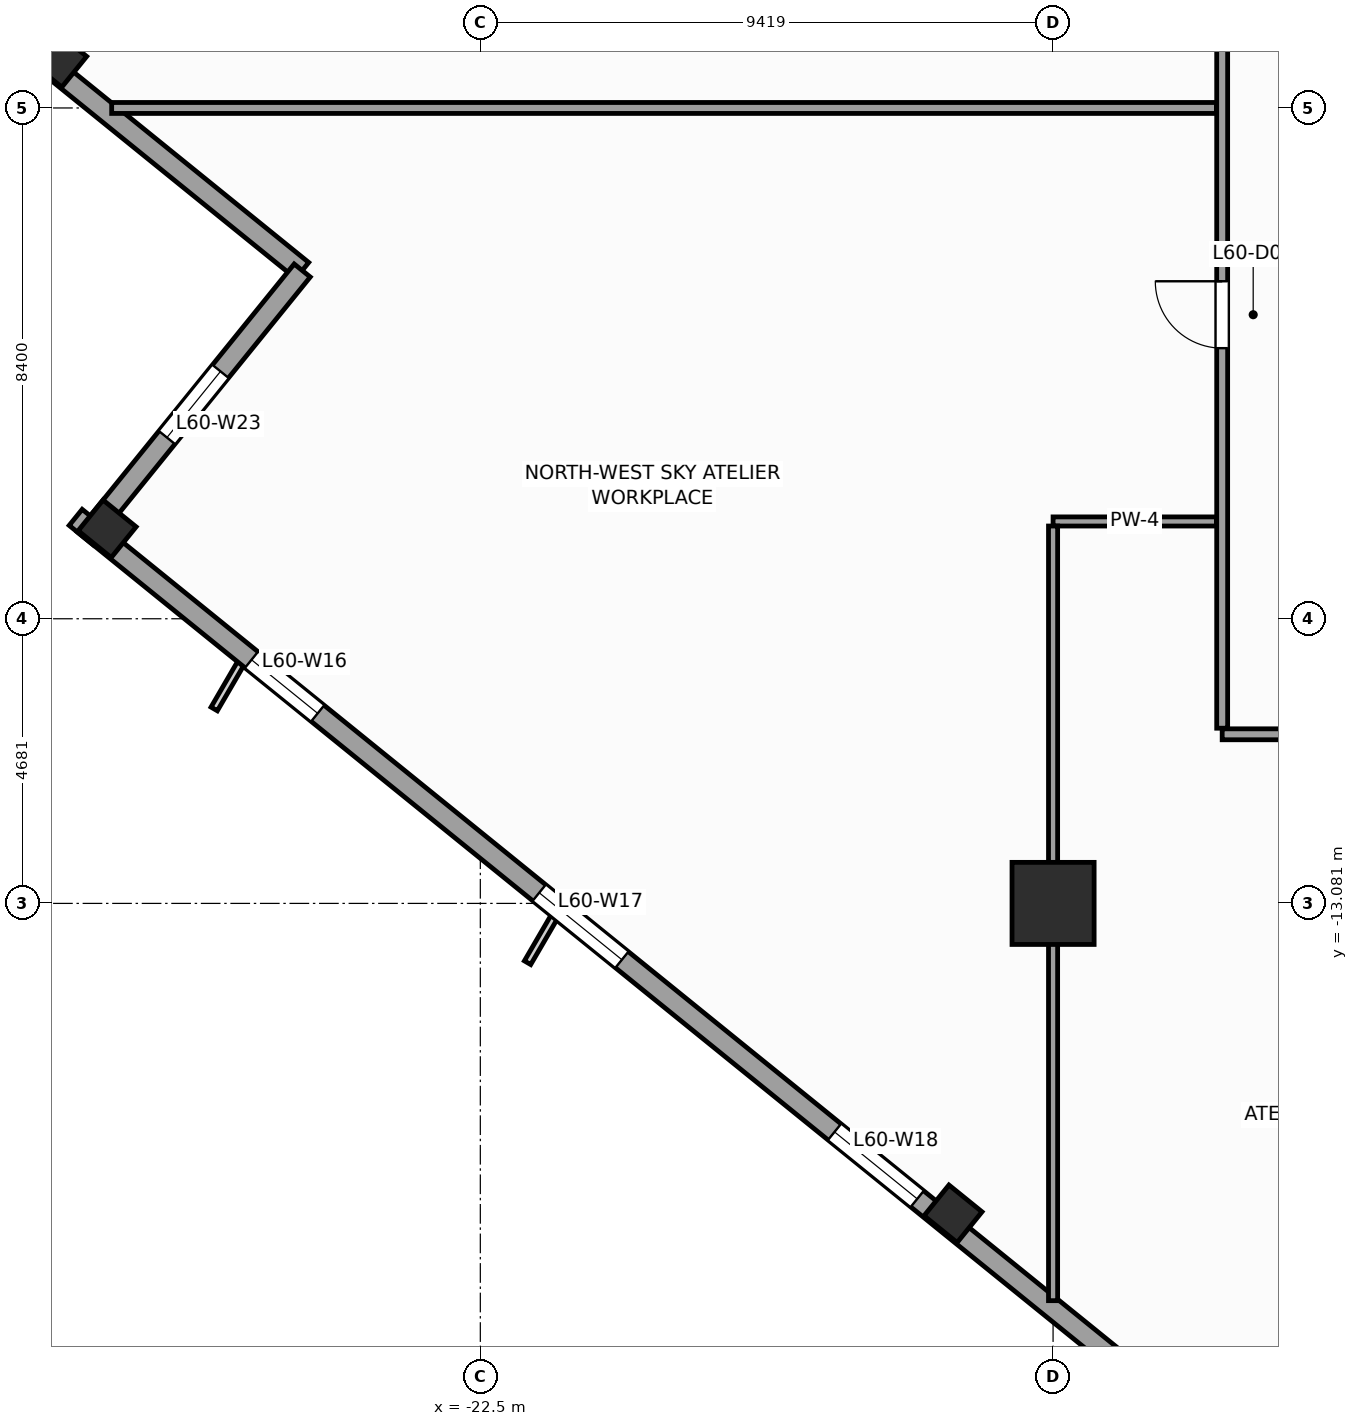
"""IFC4 building model, lengths in metres.
Left out: names, types, materials, properties, quantities, classifications, styles, units other than length and angle.
Written with IfcOpenShell. Run it as: python <this file> out.ifc"""

import sys

from ifc_helpers import new_model, si_unit, direction, frame, frame_2d, origin, origin_2d, place, context, subcontext, project, spatial, rectangle, extrude, source, transform, mapped, element, fill, save


model = new_model("IFC4")
c1 = context("Model", 3, precision=1e-05, world=origin(), true_north=direction((0.0, 1.0)))
c2 = subcontext(c1, "Body", "Model", "MODEL_VIEW")
j1 = project(units=[si_unit("LENGTHUNIT", "METRE"), si_unit("PLANEANGLEUNIT", "RADIAN")], contexts=[c1])
p1 = place(None, origin())
s1 = spatial("IfcSite", under=j1, at=p1, CompositionType="ELEMENT")
p2 = place(p1, origin())
s2 = spatial("IfcBuilding", under=s1, at=p2, CompositionType="ELEMENT")
p3 = place(p2, frame((0.0, 0.0, 248.5)))
s3 = spatial("IfcBuildingStorey", under=s2, at=p3, CompositionType="ELEMENT", Elevation=248.5)
m1 = source(origin(), c2, "Body", "SweptSolid", [
    extrude(rectangle(XDim=1.35, YDim=1.35, at=origin_2d()), origin(), (0.0, 0.0, 1.0), 3.9),
])
p4 = place(p3, frame((-13.081, -13.081, 0.0), z_axis=(0.0, 0.0, 1.0), x_axis=(1.0, 0.0, 0.0)))
e1 = element("IfcColumn", 1, at=p4, inside=s3, PredefinedType="COLUMN", context=c2, shape_type="MappedRepresentation", body=[
    mapped(m1, transform((0.0, 0.0, 0.0), scale=1.0)),
])
m2 = source(origin(), c2, "Body", "SweptSolid", [
    extrude(rectangle(XDim=0.65, YDim=0.7, at=origin_2d()), origin(), (0.0, 0.0, 1.0), 3.9),
])
for number, where, z_axis, x_axis in (
    (2, (-29.45, 0.815, 0.0), (0.0, 0.0, 1.0), (0.629, 0.777, 0.0)),
    (3, (-28.637, -6.92, 0.0), (0.0, 0.0, 1.0), (0.629, 0.777, 0.0)),
    (4, (-14.726, -18.185, 0.0), (0.0, 0.0, 1.0), (0.629, 0.777, 0.0)),
):
    element("IfcColumn", number, at=place(p3, frame(where, z_axis=z_axis, x_axis=x_axis)), inside=s3, PredefinedType="COLUMN", context=c2, shape_type="MappedRepresentation", body=[
        mapped(m2, transform((0.0, 0.0, 0.0), scale=1.0)),
    ])
p5 = place(p3, frame((-6.733, 29.154, 0.0), z_axis=(0.0, 0.0, 1.0), x_axis=(-0.629325378072, -0.77714192302, 0.0)))
e5 = element("IfcWall", 5, at=p5, inside=s3, PredefinedType="STANDARD", context=c2, shape_type="SweptSolid", body=[
    extrude(rectangle(XDim=36.84, YDim=0.34, at=frame_2d((18.42, 0.0))), origin(), (0.0, 0.0, 1.0), 2.96),
])
p6 = place(p5, frame((12.295, 0.0, 0.0)))
e6 = element("IfcOpeningElement", 6, at=p6, cuts=e5, PredefinedType="OPENING", context=c2, shape_type="SweptSolid", body=[
    extrude(rectangle(XDim=1.05, YDim=2.25, at=frame_2d((0.525, 1.125))), frame((0.0, 0.18, 0.0), z_axis=(0.0, -1.0, 0.0), x_axis=(1.0, 0.0, 0.0)), (0.0, 0.0, 1.0), 0.36),
])
p7 = place(p5, frame((3.721, 0.0, 0.48)))
e7 = element("IfcOpeningElement", 7, at=p7, cuts=e5, PredefinedType="OPENING", context=c2, shape_type="SweptSolid", body=[
    extrude(rectangle(XDim=1.4, YDim=2.4, at=frame_2d((0.7, 1.2))), frame((0.0, 0.18, 0.0), z_axis=(0.0, -1.0, 0.0), x_axis=(1.0, 0.0, 0.0)), (0.0, 0.0, 1.0), 0.36),
])
p8 = place(p5, frame((9.059, 0.0, 0.58)))
e8 = element("IfcOpeningElement", 8, at=p8, cuts=e5, PredefinedType="OPENING", context=c2, shape_type="SweptSolid", body=[
    extrude(rectangle(XDim=1.75, YDim=2.3, at=frame_2d((0.875, 1.15))), frame((0.0, 0.18, 0.0), z_axis=(0.0, -1.0, 0.0), x_axis=(1.0, 0.0, 0.0)), (0.0, 0.0, 1.0), 0.36),
])
p9 = place(p5, frame((16.058, 0.0, 0.58)))
e9 = element("IfcOpeningElement", 9, at=p9, cuts=e5, PredefinedType="OPENING", context=c2, shape_type="SweptSolid", body=[
    extrude(rectangle(XDim=1.75, YDim=2.3, at=frame_2d((0.875, 1.15))), frame((0.0, 0.18, 0.0), z_axis=(0.0, -1.0, 0.0), x_axis=(1.0, 0.0, 0.0)), (0.0, 0.0, 1.0), 0.36),
])
p10 = place(p5, frame((24.176, 0.0, 0.58)))
e10 = element("IfcOpeningElement", 10, at=p10, cuts=e5, PredefinedType="OPENING", context=c2, shape_type="SweptSolid", body=[
    extrude(rectangle(XDim=1.75, YDim=2.3, at=frame_2d((0.875, 1.15))), frame((0.0, 0.18, 0.0), z_axis=(0.0, -1.0, 0.0), x_axis=(1.0, 0.0, 0.0)), (0.0, 0.0, 1.0), 0.36),
])
p11 = place(p5, frame((30.982, 0.0, 0.48)))
e11 = element("IfcOpeningElement", 11, at=p11, cuts=e5, PredefinedType="OPENING", context=c2, shape_type="SweptSolid", body=[
    extrude(rectangle(XDim=1.4, YDim=2.4, at=frame_2d((0.7, 1.2))), frame((0.0, 0.18, 0.0), z_axis=(0.0, -1.0, 0.0), x_axis=(1.0, 0.0, 0.0)), (0.0, 0.0, 1.0), 0.36),
])
p12 = place(p3, frame((-29.703, 0.789, 0.0), z_axis=(0.0, 0.0, 1.0), x_axis=(0.77714355312, -0.629323365087, 0.0)))
e12 = element("IfcWall", 12, at=p12, inside=s3, PredefinedType="STANDARD", context=c2, shape_type="SweptSolid", body=[
    extrude(rectangle(XDim=5.5, YDim=0.34, at=frame_2d((2.75, 0.0))), origin(), (0.0, 0.0, 1.0), 3.66),
])
p13 = place(p3, frame((-25.429, -2.673, 0.0), z_axis=(0.0, 0.0, 1.0), x_axis=(-0.629299794138, -0.777162640055, 0.0)))
e13 = element("IfcWall", 13, at=p13, inside=s3, PredefinedType="STANDARD", context=c2, shape_type="SweptSolid", body=[
    extrude(rectangle(XDim=5.67, YDim=0.34, at=frame_2d((2.835, 0.0))), origin(), (0.0, 0.0, 1.0), 3.66),
])
p14 = place(p13, frame((2.135, 0.0, 0.48)))
e14 = element("IfcOpeningElement", 14, at=p14, cuts=e13, PredefinedType="OPENING", context=c2, shape_type="SweptSolid", body=[
    extrude(rectangle(XDim=1.4, YDim=2.4, at=frame_2d((0.7, 1.2))), frame((0.0, 0.18, 0.0), z_axis=(0.0, -1.0, 0.0), x_axis=(1.0, 0.0, 0.0)), (0.0, 0.0, 1.0), 0.36),
])
p15 = place(p3, frame((-29.154, -6.733, 0.0), z_axis=(0.0, 0.0, 1.0), x_axis=(0.77714192302, -0.629325378072, 0.0)))
e15 = element("IfcWall", 15, at=p15, inside=s3, PredefinedType="STANDARD", context=c2, shape_type="SweptSolid", body=[
    extrude(rectangle(XDim=36.84, YDim=0.34, at=frame_2d((18.42, 0.0))), origin(), (0.0, 0.0, 1.0), 2.96),
])
p16 = place(p15, frame((3.721, 0.0, 0.48)))
e16 = element("IfcOpeningElement", 16, at=p16, cuts=e15, PredefinedType="OPENING", context=c2, shape_type="SweptSolid", body=[
    extrude(rectangle(XDim=1.4, YDim=2.4, at=frame_2d((0.7, 1.2))), frame((0.0, 0.18, 0.0), z_axis=(0.0, -1.0, 0.0), x_axis=(1.0, 0.0, 0.0)), (0.0, 0.0, 1.0), 0.36),
])
p17 = place(p15, frame((9.809, 0.0, 0.58)))
e17 = element("IfcOpeningElement", 17, at=p17, cuts=e15, PredefinedType="OPENING", context=c2, shape_type="SweptSolid", body=[
    extrude(rectangle(XDim=1.75, YDim=2.3, at=frame_2d((0.875, 1.15))), frame((0.0, 0.18, 0.0), z_axis=(0.0, -1.0, 0.0), x_axis=(1.0, 0.0, 0.0)), (0.0, 0.0, 1.0), 0.36),
])
p18 = place(p15, frame((16.058, 0.0, 0.58)))
e18 = element("IfcOpeningElement", 18, at=p18, cuts=e15, PredefinedType="OPENING", context=c2, shape_type="SweptSolid", body=[
    extrude(rectangle(XDim=1.75, YDim=2.3, at=frame_2d((0.875, 1.15))), frame((0.0, 0.18, 0.0), z_axis=(0.0, -1.0, 0.0), x_axis=(1.0, 0.0, 0.0)), (0.0, 0.0, 1.0), 0.36),
])
p19 = place(p15, frame((24.176, 0.0, 0.58)))
e19 = element("IfcOpeningElement", 19, at=p19, cuts=e15, PredefinedType="OPENING", context=c2, shape_type="SweptSolid", body=[
    extrude(rectangle(XDim=1.75, YDim=2.3, at=frame_2d((0.875, 1.15))), frame((0.0, 0.18, 0.0), z_axis=(0.0, -1.0, 0.0), x_axis=(1.0, 0.0, 0.0)), (0.0, 0.0, 1.0), 0.36),
])
p20 = place(p15, frame((30.232, 0.0, 0.48)))
e20 = element("IfcOpeningElement", 20, at=p20, cuts=e15, PredefinedType="OPENING", context=c2, shape_type="SweptSolid", body=[
    extrude(rectangle(XDim=1.4, YDim=2.4, at=frame_2d((0.7, 1.2))), frame((0.0, 0.18, 0.0), z_axis=(0.0, -1.0, 0.0), x_axis=(1.0, 0.0, 0.0)), (0.0, 0.0, 1.0), 0.36),
])
p21 = place(p3, frame((-10.3, -10.3, 0.0), z_axis=(0.0, 0.0, 1.0), x_axis=(1.0, 0.0, 0.0)))
e21 = element("IfcWall", 21, at=p21, inside=s3, PredefinedType="PARTITIONING", context=c2, shape_type="SweptSolid", body=[
    extrude(rectangle(XDim=22.75, YDim=0.18, at=frame_2d((11.375, 0.0))), origin(), (0.0, 0.0, 1.0), 3.66),
])
p22 = place(p21, frame((9.75, 0.0, 0.0)))
e22 = element("IfcOpeningElement", 22, at=p22, cuts=e21, PredefinedType="OPENING", context=c2, shape_type="SweptSolid", body=[
    extrude(rectangle(XDim=1.1, YDim=2.2, at=frame_2d((0.55, 1.1))), frame((0.0, 0.1, 0.0), z_axis=(0.0, -1.0, 0.0), x_axis=(1.0, 0.0, 0.0)), (0.0, 0.0, 1.0), 0.2),
])
p23 = place(p21, frame((2.865, 0.0, 0.0)))
e23 = element("IfcOpeningElement", 23, at=p23, cuts=e21, PredefinedType="OPENING", context=c2, shape_type="SweptSolid", body=[
    extrude(rectangle(XDim=1.1, YDim=2.2, at=frame_2d((0.55, 1.1))), frame((0.0, 0.1, 0.0), z_axis=(0.0, -1.0, 0.0), x_axis=(1.0, 0.0, 0.0)), (0.0, 0.0, 1.0), 0.2),
])
p24 = place(p3, frame((-10.3, -10.2, 0.0), z_axis=(0.0, 0.0, 1.0), x_axis=(0.0, 1.0, 0.0)))
e24 = element("IfcWall", 24, at=p24, inside=s3, PredefinedType="PARTITIONING", context=c2, shape_type="SweptSolid", body=[
    extrude(rectangle(XDim=21.5, YDim=0.18, at=frame_2d((10.75, 0.0))), origin(), (0.0, 0.0, 1.0), 3.66),
])
p25 = place(p24, frame((15.135, 0.0, 0.0)))
e25 = element("IfcOpeningElement", 25, at=p25, cuts=e24, PredefinedType="OPENING", context=c2, shape_type="SweptSolid", body=[
    extrude(rectangle(XDim=1.1, YDim=2.2, at=frame_2d((0.55, 1.1))), frame((0.0, 0.1, 0.0), z_axis=(0.0, -1.0, 0.0), x_axis=(1.0, 0.0, 0.0)), (0.0, 0.0, 1.0), 0.2),
])
p26 = place(p24, frame((6.25, 0.0, 0.0)))
e26 = element("IfcOpeningElement", 26, at=p26, cuts=e24, PredefinedType="OPENING", context=c2, shape_type="SweptSolid", body=[
    extrude(rectangle(XDim=1.1, YDim=2.2, at=frame_2d((0.55, 1.1))), frame((0.0, 0.1, 0.0), z_axis=(0.0, -1.0, 0.0), x_axis=(1.0, 0.0, 0.0)), (0.0, 0.0, 1.0), 0.2),
])
p27 = place(p3, frame((-10.395, 0.0, 0.0), z_axis=(0.0, 0.0, 1.0), x_axis=(-1.0, 0.0, 0.0)))
e27 = element("IfcWall", 27, at=p27, inside=s3, PredefinedType="PARTITIONING", context=c2, shape_type="SweptSolid", body=[
    extrude(rectangle(XDim=18.167, YDim=0.18, at=frame_2d((9.084, 0.0))), origin(), (0.0, 0.0, 1.0), 3.66),
])
p28 = place(p3, frame((-10.395, -6.8, 0.0), z_axis=(0.0, 0.0, 1.0), x_axis=(-1.0, 0.0, 0.0)))
e28 = element("IfcWall", 28, at=p28, inside=s3, PredefinedType="PARTITIONING", context=c2, shape_type="SweptSolid", body=[
    extrude(rectangle(XDim=2.686, YDim=0.15, at=frame_2d((1.343, 0.0))), origin(), (0.0, 0.0, 1.0), 3.66),
])
p29 = place(p3, frame((-13.081, -6.875, 0.0), z_axis=(0.0, 0.0, 1.0), x_axis=(0.0, -1.0, 0.0)))
e29 = element("IfcWall", 29, at=p29, inside=s3, PredefinedType="PARTITIONING", context=c2, shape_type="SweptSolid", body=[
    extrude(rectangle(XDim=12.739, YDim=0.15, at=frame_2d((6.37, 0.0))), origin(), (0.0, 0.0, 1.0), 2.76),
])
m3 = source(origin(), c2, "Body", "SweptSolid", [
    extrude(rectangle(XDim=1.4, YDim=2.4, at=frame_2d((0.7, 1.2))), frame((0.0, 0.03, 0.0), z_axis=(0.0, -1.0, 0.0), x_axis=(1.0, 0.0, 0.0)), (0.0, 0.0, 1.0), 0.06),
])
p30 = place(p16, origin())
e30 = element("IfcWindow", 30, at=p30, inside=s3, PartitioningType="SINGLE_PANEL", PredefinedType="WINDOW", context=c2, shape_type="MappedRepresentation", body=[
    mapped(m3, transform((0.0, 0.0, 0.0), scale=1.0)),
])
fill(e16, e30)
m4 = source(origin(), c2, "Body", "SweptSolid", [
    extrude(rectangle(XDim=1.75, YDim=2.3, at=frame_2d((0.875, 1.15))), frame((0.0, 0.03, 0.0), z_axis=(0.0, -1.0, 0.0), x_axis=(1.0, 0.0, 0.0)), (0.0, 0.0, 1.0), 0.06),
])
p31 = place(p17, origin())
e31 = element("IfcWindow", 31, at=p31, inside=s3, PartitioningType="SINGLE_PANEL", PredefinedType="WINDOW", context=c2, shape_type="MappedRepresentation", body=[
    mapped(m4, transform((0.0, 0.0, 0.0), scale=1.0)),
])
fill(e17, e31)
p32 = place(p18, origin())
e32 = element("IfcWindow", 32, at=p32, inside=s3, PartitioningType="SINGLE_PANEL", PredefinedType="WINDOW", context=c2, shape_type="MappedRepresentation", body=[
    mapped(m4, transform((0.0, 0.0, 0.0), scale=1.0)),
])
fill(e18, e32)
p33 = place(p14, origin())
e33 = element("IfcWindow", 33, at=p33, inside=s3, PartitioningType="SINGLE_PANEL", PredefinedType="WINDOW", context=c2, shape_type="MappedRepresentation", body=[
    mapped(m3, transform((0.0, 0.0, 0.0), scale=1.0)),
])
fill(e14, e33)
m5 = source(origin(), c2, "Body", "SweptSolid", [
    extrude(rectangle(XDim=1.1, YDim=2.2, at=frame_2d((0.55, 1.1))), frame((0.0, 0.025, 0.0), z_axis=(0.0, -1.0, 0.0), x_axis=(1.0, 0.0, 0.0)), (0.0, 0.0, 1.0), 0.05),
])
p34 = place(p26, origin())
e34 = element("IfcDoor", 34, at=p34, inside=s3, OperationType="SINGLE_SWING_RIGHT", PredefinedType="DOOR", context=c2, shape_type="MappedRepresentation", body=[
    mapped(m5, transform((0.0, 0.0, 0.0), scale=1.0)),
])
fill(e26, e34)
save(model, sys.argv[1])
